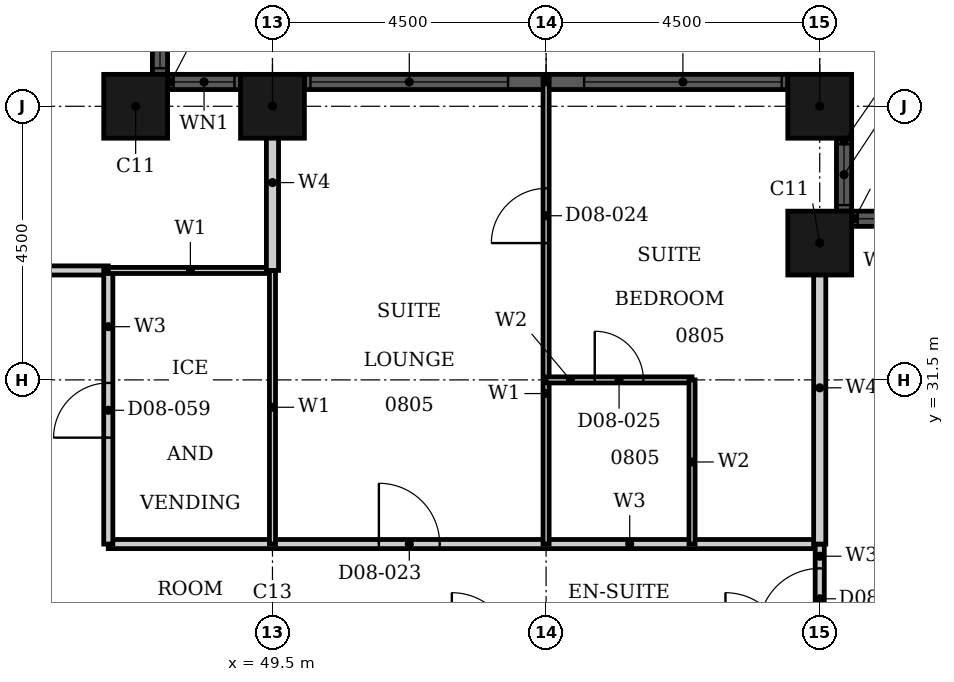
"""IFC4 building model, lengths in metres.
Left out: names, types, materials, properties, quantities, classifications, styles, units other than length and angle.
Written with IfcOpenShell. Run it as: python <this file> out.ifc"""

import sys

from ifc_helpers import new_model, si_unit, direction, frame, frame_2d, origin, origin_2d, place, context, subcontext, project, spatial, rectangle, hollow_rectangle, extrude, element, fill, save


model = new_model("IFC4")
c1 = context("Model", 3, precision=1e-05, world=origin(), true_north=direction((0.0, 1.0)))
c2 = subcontext(c1, "Body", "Model", "MODEL_VIEW")
j1 = project(units=[si_unit("LENGTHUNIT", "METRE"), si_unit("PLANEANGLEUNIT", "RADIAN")], contexts=[c1])
p1 = place(None, origin())
s1 = spatial("IfcSite", under=j1, at=p1, CompositionType="ELEMENT")
p2 = place(p1, origin())
s2 = spatial("IfcBuilding", under=s1, at=p2, CompositionType="ELEMENT")
p3 = place(p2, frame((0.0, 0.0, 40.8)))
s3 = spatial("IfcBuildingStorey", under=s2, at=p3, CompositionType="ELEMENT", Elevation=40.8)
for number, where, z_axis, x_axis in (
    (1, (58.5, 33.75, 0.0), (0.0, 0.0, 1.0), (1.0, 0.0, 0.0)),
    (2, (58.5, 36.0, 0.0), (0.0, 0.0, 1.0), (1.0, 0.0, 0.0)),
    (3, (49.5, 36.0, 0.0), (0.0, 0.0, 1.0), (1.0, 0.0, 0.0)),
    (4, (47.25, 36.0, 0.0), (0.0, 0.0, 1.0), (1.0, 0.0, 0.0)),
):
    element("IfcColumn", number, at=place(p3, frame(where, z_axis=z_axis, x_axis=x_axis)), inside=s3, PredefinedType="COLUMN", context=c2, shape_type="SweptSolid", body=[
        extrude(hollow_rectangle(XDim=1.05, YDim=1.05, WallThickness=0.034, at=origin_2d()), origin(), (0.0, 0.0, 1.0), 3.6),
    ])
p4 = place(p3, frame((60.225, 34.15, 0.0), z_axis=(0.0, 0.0, 1.0), x_axis=(-1.0, 0.0, 0.0)))
e5 = element("IfcWall", 5, at=p4, inside=s3, PredefinedType="SOLIDWALL", context=c2, shape_type="SweptSolid", body=[
    extrude(rectangle(XDim=1.2, YDim=0.25, at=frame_2d((0.6, 0.0))), origin(), (0.0, 0.0, 1.0), 3.6),
])
p5 = place(p4, frame((0.1, 0.0, 0.9)))
e6 = element("IfcOpeningElement", 6, at=p5, cuts=e5, PredefinedType="OPENING", context=c2, shape_type="SweptSolid", body=[
    extrude(rectangle(XDim=1.0, YDim=2.08, at=frame_2d((0.5, 1.04))), frame((0.0, 0.135, 0.0), z_axis=(0.0, -1.0, 0.0), x_axis=(1.0, 0.0, 0.0)), (0.0, 0.0, 1.0), 0.27),
])
p6 = place(p3, frame((58.9, 34.275, 0.0), z_axis=(0.0, 0.0, 1.0), x_axis=(0.0, 1.0, 0.0)))
e7 = element("IfcWall", 7, at=p6, inside=s3, PredefinedType="SOLIDWALL", context=c2, shape_type="SweptSolid", body=[
    extrude(rectangle(XDim=1.2, YDim=0.25, at=frame_2d((0.6, 0.0))), origin(), (0.0, 0.0, 1.0), 3.6),
])
p7 = place(p6, frame((0.1, 0.0, 0.9)))
e8 = element("IfcOpeningElement", 8, at=p7, cuts=e7, PredefinedType="OPENING", context=c2, shape_type="SweptSolid", body=[
    extrude(rectangle(XDim=1.0, YDim=2.08, at=frame_2d((0.5, 1.04))), frame((0.0, 0.135, 0.0), z_axis=(0.0, -1.0, 0.0), x_axis=(1.0, 0.0, 0.0)), (0.0, 0.0, 1.0), 0.27),
])
p8 = place(p3, frame((57.975, 36.4, 0.0), z_axis=(0.0, 0.0, 1.0), x_axis=(-1.0, 0.0, 0.0)))
e9 = element("IfcWall", 9, at=p8, inside=s3, PredefinedType="SOLIDWALL", context=c2, shape_type="SweptSolid", body=[
    extrude(rectangle(XDim=7.95, YDim=0.25, at=frame_2d((3.975, 0.0))), origin(), (0.0, 0.0, 1.0), 3.6),
])
p9 = place(p8, frame((0.1, 0.0, 0.9)))
e10 = element("IfcOpeningElement", 10, at=p9, cuts=e9, PredefinedType="OPENING", context=c2, shape_type="SweptSolid", body=[
    extrude(rectangle(XDim=3.25, YDim=2.08, at=frame_2d((1.625, 1.04))), frame((0.0, 0.135, 0.0), z_axis=(0.0, -1.0, 0.0), x_axis=(1.0, 0.0, 0.0)), (0.0, 0.0, 1.0), 0.27),
])
p10 = place(p8, frame((4.6, 0.0, 0.9)))
e11 = element("IfcOpeningElement", 11, at=p10, cuts=e9, PredefinedType="OPENING", context=c2, shape_type="SweptSolid", body=[
    extrude(rectangle(XDim=3.25, YDim=2.08, at=frame_2d((1.625, 1.04))), frame((0.0, 0.135, 0.0), z_axis=(0.0, -1.0, 0.0), x_axis=(1.0, 0.0, 0.0)), (0.0, 0.0, 1.0), 0.27),
])
p11 = place(p3, frame((48.975, 36.4, 0.0), z_axis=(0.0, 0.0, 1.0), x_axis=(-1.0, 0.0, 0.0)))
e12 = element("IfcWall", 12, at=p11, inside=s3, PredefinedType="SOLIDWALL", context=c2, shape_type="SweptSolid", body=[
    extrude(rectangle(XDim=1.2, YDim=0.25, at=frame_2d((0.6, 0.0))), origin(), (0.0, 0.0, 1.0), 3.6),
])
p12 = place(p11, frame((0.1, 0.0, 0.9)))
e13 = element("IfcOpeningElement", 13, at=p12, cuts=e12, PredefinedType="OPENING", context=c2, shape_type="SweptSolid", body=[
    extrude(rectangle(XDim=1.0, YDim=2.08, at=frame_2d((0.5, 1.04))), frame((0.0, 0.135, 0.0), z_axis=(0.0, -1.0, 0.0), x_axis=(1.0, 0.0, 0.0)), (0.0, 0.0, 1.0), 0.27),
])
p13 = place(p3, frame((47.65, 36.525, 0.0), z_axis=(0.0, 0.0, 1.0), x_axis=(0.0, 1.0, 0.0)))
e14 = element("IfcWall", 14, at=p13, inside=s3, PredefinedType="SOLIDWALL", context=c2, shape_type="SweptSolid", body=[
    extrude(rectangle(XDim=1.2, YDim=0.25, at=frame_2d((0.6, 0.0))), origin(), (0.0, 0.0, 1.0), 3.6),
])
p14 = place(p13, frame((0.1, 0.0, 0.9)))
e15 = element("IfcOpeningElement", 15, at=p14, cuts=e14, PredefinedType="OPENING", context=c2, shape_type="SweptSolid", body=[
    extrude(rectangle(XDim=1.0, YDim=2.08, at=frame_2d((0.5, 1.04))), frame((0.0, 0.135, 0.0), z_axis=(0.0, -1.0, 0.0), x_axis=(1.0, 0.0, 0.0)), (0.0, 0.0, 1.0), 0.27),
])
p15 = place(p3, frame((46.8, 28.8, 0.0), z_axis=(0.0, 0.0, 1.0), x_axis=(1.0, 0.0, 0.0)))
e16 = element("IfcWall", 16, at=p15, inside=s3, PredefinedType="PARTITIONING", context=c2, shape_type="SweptSolid", body=[
    extrude(rectangle(XDim=11.7, YDim=0.15, at=frame_2d((5.85, 0.0))), origin(), (0.0, 0.0, 1.0), 3.3),
])
p16 = place(p15, frame((4.45, 0.0, 0.0)))
e17 = element("IfcOpeningElement", 17, at=p16, cuts=e16, PredefinedType="OPENING", context=c2, shape_type="SweptSolid", body=[
    extrude(rectangle(XDim=1.0, YDim=2.1, at=frame_2d((0.5, 1.05))), frame((0.0, 0.085, 0.0), z_axis=(0.0, -1.0, 0.0), x_axis=(1.0, 0.0, 0.0)), (0.0, 0.0, 1.0), 0.17),
])
p17 = place(p3, frame((33.3, 33.3, 0.0), z_axis=(0.0, 0.0, 1.0), x_axis=(1.0, 0.0, 0.0)))
e18 = element("IfcWall", 18, at=p17, inside=s3, PredefinedType="PARTITIONING", context=c2, shape_type="SweptSolid", body=[
    extrude(rectangle(XDim=13.5, YDim=0.15, at=frame_2d((6.75, 0.0))), origin(), (0.0, 0.0, 1.0), 3.3),
])
p18 = place(p17, frame((10.15, 0.0, 0.0)))
e19 = element("IfcOpeningElement", 19, at=p18, cuts=e18, PredefinedType="OPENING", context=c2, shape_type="SweptSolid", body=[
    extrude(rectangle(XDim=1.0, YDim=2.1, at=frame_2d((0.5, 1.05))), frame((0.0, 0.085, 0.0), z_axis=(0.0, -1.0, 0.0), x_axis=(1.0, 0.0, 0.0)), (0.0, 0.0, 1.0), 0.17),
])
p19 = place(p17, frame((0.75, 0.0, 0.0)))
e20 = element("IfcOpeningElement", 20, at=p19, cuts=e18, PredefinedType="OPENING", context=c2, shape_type="SweptSolid", body=[
    extrude(rectangle(XDim=0.9, YDim=2.1, at=frame_2d((0.45, 1.05))), frame((0.0, 0.085, 0.0), z_axis=(0.0, -1.0, 0.0), x_axis=(1.0, 0.0, 0.0)), (0.0, 0.0, 1.0), 0.17),
])
p20 = place(p17, frame((4.35, 0.0, 0.0)))
e21 = element("IfcOpeningElement", 21, at=p20, cuts=e18, PredefinedType="OPENING", context=c2, shape_type="SweptSolid", body=[
    extrude(rectangle(XDim=0.9, YDim=2.1, at=frame_2d((0.45, 1.05))), frame((0.0, 0.085, 0.0), z_axis=(0.0, -1.0, 0.0), x_axis=(1.0, 0.0, 0.0)), (0.0, 0.0, 1.0), 0.17),
])
p21 = place(p3, frame((46.8, 28.8, 0.0), z_axis=(0.0, 0.0, 1.0), x_axis=(0.0, 1.0, 0.0)))
e22 = element("IfcWall", 22, at=p21, inside=s3, PredefinedType="PARTITIONING", context=c2, shape_type="SweptSolid", body=[
    extrude(rectangle(XDim=4.5, YDim=0.15, at=frame_2d((2.25, 0.0))), origin(), (0.0, 0.0, 1.0), 3.3),
])
p22 = place(p21, frame((1.75, 0.0, 0.0)))
e23 = element("IfcOpeningElement", 23, at=p22, cuts=e22, PredefinedType="OPENING", context=c2, shape_type="SweptSolid", body=[
    extrude(rectangle(XDim=0.9, YDim=2.1, at=frame_2d((0.45, 1.05))), frame((0.0, 0.085, 0.0), z_axis=(0.0, -1.0, 0.0), x_axis=(1.0, 0.0, 0.0)), (0.0, 0.0, 1.0), 0.17),
])
p23 = place(p3, frame((58.5, 27.0, 0.0), z_axis=(0.0, 0.0, 1.0), x_axis=(0.0, 1.0, 0.0)))
e24 = element("IfcWall", 24, at=p23, inside=s3, PredefinedType="PARTITIONING", context=c2, shape_type="SweptSolid", body=[
    extrude(rectangle(XDim=1.8, YDim=0.15, at=frame_2d((0.9, 0.0))), origin(), (0.0, 0.0, 1.0), 3.3),
])
p24 = place(p23, frame((0.4, 0.0, 0.0)))
e25 = element("IfcOpeningElement", 25, at=p24, cuts=e24, PredefinedType="OPENING", context=c2, shape_type="SweptSolid", body=[
    extrude(rectangle(XDim=1.0, YDim=2.1, at=frame_2d((0.5, 1.05))), frame((0.0, 0.085, 0.0), z_axis=(0.0, -1.0, 0.0), x_axis=(1.0, 0.0, 0.0)), (0.0, 0.0, 1.0), 0.17),
])
p25 = place(p3, frame((46.8, 33.3, 0.0), z_axis=(0.0, 0.0, 1.0), x_axis=(1.0, 0.0, 0.0)))
e26 = element("IfcWall", 26, at=p25, inside=s3, PredefinedType="PARTITIONING", context=c2, shape_type="SweptSolid", body=[
    extrude(rectangle(XDim=2.7, YDim=0.1, at=frame_2d((1.35, 0.0))), origin(), (0.0, 0.0, 1.0), 3.3),
])
p26 = place(p3, frame((49.5, 28.8, 0.0), z_axis=(0.0, 0.0, 1.0), x_axis=(0.0, 1.0, 0.0)))
e27 = element("IfcWall", 27, at=p26, inside=s3, PredefinedType="PARTITIONING", context=c2, shape_type="SweptSolid", body=[
    extrude(rectangle(XDim=4.5, YDim=0.1, at=frame_2d((2.25, 0.0))), origin(), (0.0, 0.0, 1.0), 2.38),
])
p27 = place(p3, frame((54.0, 28.8, 0.0), z_axis=(0.0, 0.0, 1.0), x_axis=(0.0, 1.0, 0.0)))
e28 = element("IfcWall", 28, at=p27, inside=s3, PredefinedType="PARTITIONING", context=c2, shape_type="SweptSolid", body=[
    extrude(rectangle(XDim=7.665, YDim=0.1, at=frame_2d((3.833, 0.0))), origin(), (0.0, 0.0, 1.0), 3.3),
])
p28 = place(p27, frame((4.95, 0.0, 0.0)))
e29 = element("IfcOpeningElement", 29, at=p28, cuts=e28, PredefinedType="OPENING", context=c2, shape_type="SweptSolid", body=[
    extrude(rectangle(XDim=0.9, YDim=2.1, at=frame_2d((0.45, 1.05))), frame((0.0, 0.06, 0.0), z_axis=(0.0, -1.0, 0.0), x_axis=(1.0, 0.0, 0.0)), (0.0, 0.0, 1.0), 0.12),
])
p29 = place(p3, frame((49.5, 33.3, 0.0), z_axis=(0.0, 0.0, 1.0), x_axis=(0.0, 1.0, 0.0)))
e30 = element("IfcWall", 30, at=p29, inside=s3, PredefinedType="PARTITIONING", context=c2, shape_type="SweptSolid", body=[
    extrude(rectangle(XDim=2.89, YDim=0.2, at=frame_2d((1.445, 0.0))), origin(), (0.0, 0.0, 1.0), 2.38),
])
p30 = place(p3, frame((58.5, 28.8, 0.0), z_axis=(0.0, 0.0, 1.0), x_axis=(0.0, 1.0, 0.0)))
e31 = element("IfcWall", 31, at=p30, inside=s3, PredefinedType="PARTITIONING", context=c2, shape_type="SweptSolid", body=[
    extrude(rectangle(XDim=5.14, YDim=0.2, at=frame_2d((2.57, 0.0))), origin(), (0.0, 0.0, 1.0), 3.3),
])
p31 = place(p3, frame((54.0, 31.5, 0.0), z_axis=(0.0, 0.0, 1.0), x_axis=(1.0, 0.0, 0.0)))
e32 = element("IfcWall", 32, at=p31, inside=s3, PredefinedType="PARTITIONING", context=c2, shape_type="SweptSolid", body=[
    extrude(rectangle(XDim=2.4, YDim=0.1, at=frame_2d((1.2, 0.0))), origin(), (0.0, 0.0, 1.0), 2.58),
])
p32 = place(p31, frame((0.8, 0.0, 0.0)))
e33 = element("IfcOpeningElement", 33, at=p32, cuts=e32, PredefinedType="OPENING", context=c2, shape_type="SweptSolid", body=[
    extrude(rectangle(XDim=0.8, YDim=2.1, at=frame_2d((0.4, 1.05))), frame((0.0, 0.06, 0.0), z_axis=(0.0, -1.0, 0.0), x_axis=(1.0, 0.0, 0.0)), (0.0, 0.0, 1.0), 0.12),
])
p33 = place(p3, frame((56.4, 28.8, 0.0), z_axis=(0.0, 0.0, 1.0), x_axis=(0.0, 1.0, 0.0)))
e34 = element("IfcWall", 34, at=p33, inside=s3, PredefinedType="PARTITIONING", context=c2, shape_type="SweptSolid", body=[
    extrude(rectangle(XDim=2.7, YDim=0.1, at=frame_2d((1.35, 0.0))), origin(), (0.0, 0.0, 1.0), 3.3),
])
p34 = place(p5, origin())
e35 = element("IfcWindow", 35, at=p34, inside=s3, PartitioningType="SINGLE_PANEL", PredefinedType="WINDOW", context=c2, shape_type="SweptSolid", body=[
    extrude(rectangle(XDim=1.0, YDim=2.08, at=frame_2d((0.5, 1.04))), frame((0.0, 0.03, 0.0), z_axis=(0.0, -1.0, 0.0), x_axis=(1.0, 0.0, 0.0)), (0.0, 0.0, 1.0), 0.06),
])
fill(e6, e35)
p35 = place(p7, origin())
e36 = element("IfcWindow", 36, at=p35, inside=s3, PartitioningType="SINGLE_PANEL", PredefinedType="WINDOW", context=c2, shape_type="SweptSolid", body=[
    extrude(rectangle(XDim=1.0, YDim=2.08, at=frame_2d((0.5, 1.04))), frame((0.0, 0.03, 0.0), z_axis=(0.0, -1.0, 0.0), x_axis=(1.0, 0.0, 0.0)), (0.0, 0.0, 1.0), 0.06),
])
fill(e8, e36)
p36 = place(p9, origin())
e37 = element("IfcWindow", 37, at=p36, inside=s3, PartitioningType="SINGLE_PANEL", PredefinedType="WINDOW", context=c2, shape_type="SweptSolid", body=[
    extrude(rectangle(XDim=3.25, YDim=2.08, at=frame_2d((1.625, 1.04))), frame((0.0, 0.03, 0.0), z_axis=(0.0, -1.0, 0.0), x_axis=(1.0, 0.0, 0.0)), (0.0, 0.0, 1.0), 0.06),
])
fill(e10, e37)
p37 = place(p10, origin())
e38 = element("IfcWindow", 38, at=p37, inside=s3, PartitioningType="SINGLE_PANEL", PredefinedType="WINDOW", context=c2, shape_type="SweptSolid", body=[
    extrude(rectangle(XDim=3.25, YDim=2.08, at=frame_2d((1.625, 1.04))), frame((0.0, 0.03, 0.0), z_axis=(0.0, -1.0, 0.0), x_axis=(1.0, 0.0, 0.0)), (0.0, 0.0, 1.0), 0.06),
])
fill(e11, e38)
p38 = place(p12, origin())
e39 = element("IfcWindow", 39, at=p38, inside=s3, PartitioningType="SINGLE_PANEL", PredefinedType="WINDOW", context=c2, shape_type="SweptSolid", body=[
    extrude(rectangle(XDim=1.0, YDim=2.08, at=frame_2d((0.5, 1.04))), frame((0.0, 0.03, 0.0), z_axis=(0.0, -1.0, 0.0), x_axis=(1.0, 0.0, 0.0)), (0.0, 0.0, 1.0), 0.06),
])
fill(e13, e39)
p39 = place(p14, origin())
e40 = element("IfcWindow", 40, at=p39, inside=s3, PartitioningType="SINGLE_PANEL", PredefinedType="WINDOW", context=c2, shape_type="SweptSolid", body=[
    extrude(rectangle(XDim=1.0, YDim=2.08, at=frame_2d((0.5, 1.04))), frame((0.0, 0.03, 0.0), z_axis=(0.0, -1.0, 0.0), x_axis=(1.0, 0.0, 0.0)), (0.0, 0.0, 1.0), 0.06),
])
fill(e15, e40)
p40 = place(p16, origin())
e41 = element("IfcDoor", 41, at=p40, inside=s3, OperationType="SINGLE_SWING_LEFT", PredefinedType="DOOR", context=c2, shape_type="SweptSolid", body=[
    extrude(rectangle(XDim=1.0, YDim=2.1, at=frame_2d((0.5, 1.05))), frame((0.0, 0.025, 0.0), z_axis=(0.0, -1.0, 0.0), x_axis=(1.0, 0.0, 0.0)), (0.0, 0.0, 1.0), 0.05),
])
fill(e17, e41)
p41 = place(p28, origin())
e42 = element("IfcDoor", 42, at=p41, inside=s3, OperationType="SINGLE_SWING_RIGHT", PredefinedType="DOOR", context=c2, shape_type="SweptSolid", body=[
    extrude(rectangle(XDim=0.9, YDim=2.1, at=frame_2d((0.45, 1.05))), frame((0.0, 0.025, 0.0), z_axis=(0.0, -1.0, 0.0), x_axis=(1.0, 0.0, 0.0)), (0.0, 0.0, 1.0), 0.05),
])
fill(e29, e42)
p42 = place(p32, origin())
e43 = element("IfcDoor", 43, at=p42, inside=s3, OperationType="SINGLE_SWING_LEFT", PredefinedType="DOOR", context=c2, shape_type="SweptSolid", body=[
    extrude(rectangle(XDim=0.8, YDim=2.1, at=frame_2d((0.4, 1.05))), frame((0.0, 0.025, 0.0), z_axis=(0.0, -1.0, 0.0), x_axis=(1.0, 0.0, 0.0)), (0.0, 0.0, 1.0), 0.05),
])
fill(e33, e43)
p43 = place(p24, origin())
e44 = element("IfcDoor", 44, at=p43, inside=s3, OperationType="SINGLE_SWING_RIGHT", PredefinedType="DOOR", context=c2, shape_type="SweptSolid", body=[
    extrude(rectangle(XDim=1.0, YDim=2.1, at=frame_2d((0.5, 1.05))), frame((0.0, 0.025, 0.0), z_axis=(0.0, -1.0, 0.0), x_axis=(1.0, 0.0, 0.0)), (0.0, 0.0, 1.0), 0.05),
])
fill(e25, e44)
p44 = place(p22, origin())
e45 = element("IfcDoor", 45, at=p44, inside=s3, OperationType="SINGLE_SWING_LEFT", PredefinedType="DOOR", context=c2, shape_type="SweptSolid", body=[
    extrude(rectangle(XDim=0.9, YDim=2.1, at=frame_2d((0.45, 1.05))), frame((0.0, 0.025, 0.0), z_axis=(0.0, -1.0, 0.0), x_axis=(1.0, 0.0, 0.0)), (0.0, 0.0, 1.0), 0.05),
])
fill(e23, e45)
save(model, sys.argv[1])
